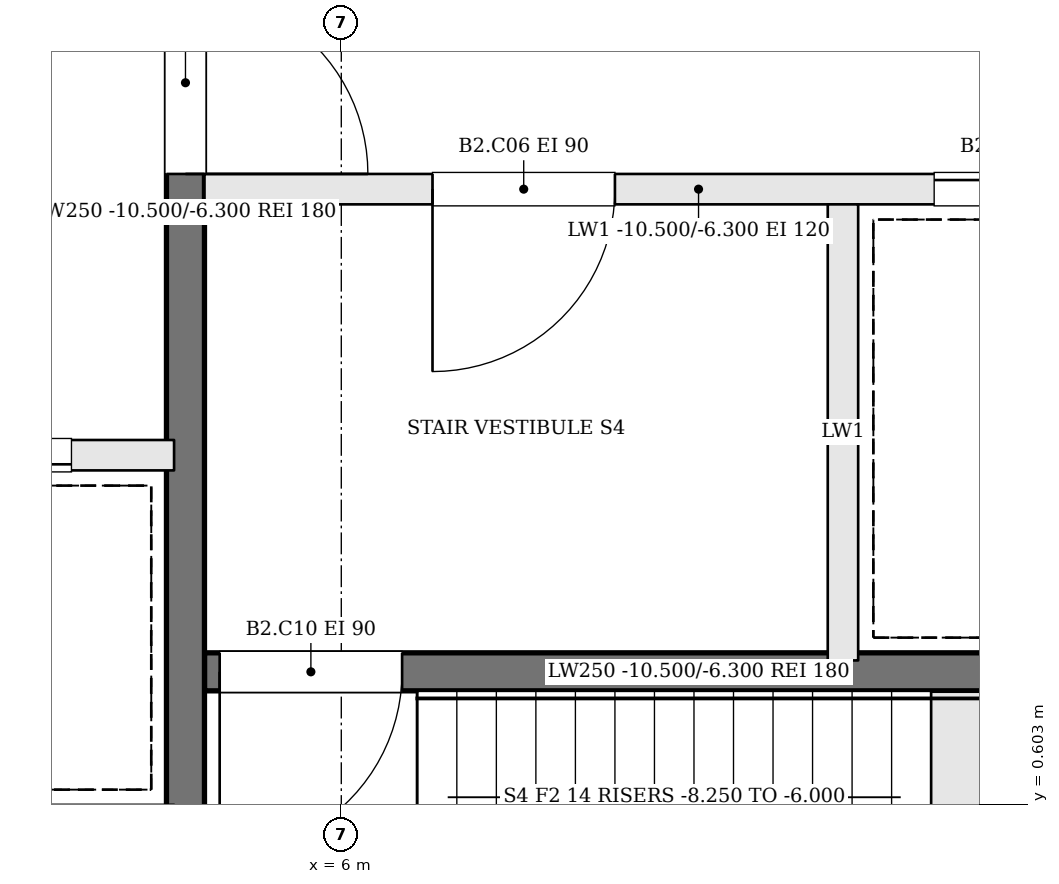
"""IFC4 building model, lengths in metres.
Left out: names, types, materials, properties, quantities, classifications, styles, units other than length and angle.
Written with IfcOpenShell. Run it as: python <this file> out.ifc"""

import sys

from ifc_helpers import new_model, si_unit, direction, frame, frame_2d, origin, place, context, subcontext, project, spatial, rectangle, extrude, element, fill, save


model = new_model("IFC4")
c1 = context("Model", 3, precision=1e-05, world=origin(), true_north=direction((0.0, 1.0)))
c2 = subcontext(c1, "Body", "Model", "MODEL_VIEW")
j1 = project(units=[si_unit("LENGTHUNIT", "METRE"), si_unit("PLANEANGLEUNIT", "RADIAN")], contexts=[c1])
p1 = place(None, origin())
s1 = spatial("IfcSite", under=j1, at=p1, CompositionType="ELEMENT")
p2 = place(p1, origin())
s2 = spatial("IfcBuilding", under=s1, at=p2, CompositionType="ELEMENT")
p3 = place(p2, frame((0.0, 0.0, -10.5)))
s3 = spatial("IfcBuildingStorey", under=s2, at=p3, CompositionType="ELEMENT", Elevation=-10.5)
p4 = place(p3, frame((11.6, 4.65, 0.0), z_axis=(0.0, 0.0, 1.0), x_axis=(-1.0, 0.0, 0.0)))
e1 = element("IfcWall", 1, at=p4, inside=s3, PredefinedType="SOLIDWALL", context=c2, shape_type="SweptSolid", body=[
    extrude(rectangle(XDim=6.5, YDim=0.2, at=frame_2d((3.25, 0.0))), origin(), (0.0, 0.0, 1.0), 4.2),
])
p5 = place(p4, frame((3.8, 0.0, 0.0)))
e2 = element("IfcOpeningElement", 2, at=p5, cuts=e1, PredefinedType="OPENING", context=c2, shape_type="SweptSolid", body=[
    extrude(rectangle(XDim=1.2, YDim=2.1, at=frame_2d((0.6, 1.05))), frame((0.0, 0.11, 0.0), z_axis=(0.0, -1.0, 0.0), x_axis=(1.0, 0.0, 0.0)), (0.0, 0.0, 1.0), 0.22),
])
p6 = place(p4, frame((0.5, 0.0, 0.0)))
e3 = element("IfcOpeningElement", 3, at=p6, cuts=e1, PredefinedType="OPENING", context=c2, shape_type="SweptSolid", body=[
    extrude(rectangle(XDim=1.2, YDim=2.1, at=frame_2d((0.6, 1.05))), frame((0.0, 0.11, 0.0), z_axis=(0.0, -1.0, 0.0), x_axis=(1.0, 0.0, 0.0)), (0.0, 0.0, 1.0), 0.22),
])
p7 = place(p3, frame((11.6, 1.475, 0.0), z_axis=(0.0, 0.0, 1.0), x_axis=(-1.0, 0.0, 0.0)))
e4 = element("IfcWall", 4, at=p7, inside=s3, PredefinedType="SOLIDWALL", context=c2, shape_type="SweptSolid", body=[
    extrude(rectangle(XDim=6.5, YDim=0.25, at=frame_2d((3.25, 0.0))), origin(), (0.0, 0.0, 1.0), 4.2),
])
p8 = place(p7, frame((5.2, 0.0, 0.0)))
e5 = element("IfcOpeningElement", 5, at=p8, cuts=e4, PredefinedType="OPENING", context=c2, shape_type="SweptSolid", body=[
    extrude(rectangle(XDim=1.2, YDim=2.1, at=frame_2d((0.6, 1.05))), frame((0.0, 0.135, 0.0), z_axis=(0.0, -1.0, 0.0), x_axis=(1.0, 0.0, 0.0)), (0.0, 0.0, 1.0), 0.27),
])
p9 = place(p3, frame((9.3, 4.55, 0.0), z_axis=(0.0, 0.0, 1.0), x_axis=(0.0, -1.0, 0.0)))
e6 = element("IfcWall", 6, at=p9, inside=s3, PredefinedType="SOLIDWALL", context=c2, shape_type="SweptSolid", body=[
    extrude(rectangle(XDim=3.0, YDim=0.2, at=frame_2d((1.5, 0.0))), origin(), (0.0, 0.0, 1.0), 4.2),
])
p10 = place(p3, frame((4.975, 10.6, 0.0), z_axis=(0.0, 0.0, 1.0), x_axis=(0.0, -1.0, 0.0)))
e7 = element("IfcWall", 7, at=p10, inside=s3, PredefinedType="SOLIDWALL", context=c2, shape_type="SweptSolid", body=[
    extrude(rectangle(XDim=12.2, YDim=0.25, at=frame_2d((6.1, 0.0))), origin(), (0.0, 0.0, 1.0), 4.2),
])
p11 = place(p10, frame((4.65, 0.0, 0.0)))
e8 = element("IfcOpeningElement", 8, at=p11, cuts=e7, PredefinedType="OPENING", context=c2, shape_type="SweptSolid", body=[
    extrude(rectangle(XDim=1.2, YDim=2.1, at=frame_2d((0.6, 1.05))), frame((0.0, 0.135, 0.0), z_axis=(0.0, -1.0, 0.0), x_axis=(1.0, 0.0, 0.0)), (0.0, 0.0, 1.0), 0.27),
])
p12 = place(p3, frame((-4.9, 2.9, 0.0), z_axis=(0.0, 0.0, 1.0), x_axis=(1.0, 0.0, 0.0)))
e9 = element("IfcWall", 9, at=p12, inside=s3, PredefinedType="SOLIDWALL", context=c2, shape_type="SweptSolid", body=[
    extrude(rectangle(XDim=9.8, YDim=0.2, at=frame_2d((4.9, 0.0))), origin(), (0.0, 0.0, 1.0), 4.2),
])
p13 = place(p12, frame((0.675, 0.0, 0.0)))
e10 = element("IfcOpeningElement", 10, at=p13, cuts=e9, PredefinedType="OPENING", context=c2, shape_type="SweptSolid", body=[
    extrude(rectangle(XDim=1.1, YDim=2.1, at=frame_2d((0.55, 1.05))), frame((0.0, 0.11, 0.0), z_axis=(0.0, -1.0, 0.0), x_axis=(1.0, 0.0, 0.0)), (0.0, 0.0, 1.0), 0.22),
])
p14 = place(p12, frame((3.125, 0.0, 0.0)))
e11 = element("IfcOpeningElement", 11, at=p14, cuts=e9, PredefinedType="OPENING", context=c2, shape_type="SweptSolid", body=[
    extrude(rectangle(XDim=1.1, YDim=2.1, at=frame_2d((0.55, 1.05))), frame((0.0, 0.11, 0.0), z_axis=(0.0, -1.0, 0.0), x_axis=(1.0, 0.0, 0.0)), (0.0, 0.0, 1.0), 0.22),
])
p15 = place(p12, frame((5.575, 0.0, 0.0)))
e12 = element("IfcOpeningElement", 12, at=p15, cuts=e9, PredefinedType="OPENING", context=c2, shape_type="SweptSolid", body=[
    extrude(rectangle(XDim=1.1, YDim=2.1, at=frame_2d((0.55, 1.05))), frame((0.0, 0.11, 0.0), z_axis=(0.0, -1.0, 0.0), x_axis=(1.0, 0.0, 0.0)), (0.0, 0.0, 1.0), 0.22),
])
p16 = place(p12, frame((8.025, 0.0, 0.0)))
e13 = element("IfcOpeningElement", 13, at=p16, cuts=e9, PredefinedType="OPENING", context=c2, shape_type="SweptSolid", body=[
    extrude(rectangle(XDim=1.1, YDim=2.1, at=frame_2d((0.55, 1.05))), frame((0.0, 0.11, 0.0), z_axis=(0.0, -1.0, 0.0), x_axis=(1.0, 0.0, 0.0)), (0.0, 0.0, 1.0), 0.22),
])
p17 = place(p11, origin())
e14 = element("IfcDoor", 14, at=p17, inside=s3, OperationType="SINGLE_SWING_RIGHT", PredefinedType="DOOR", context=c2, shape_type="SweptSolid", body=[
    extrude(rectangle(XDim=1.2, YDim=2.1, at=frame_2d((0.6, 1.05))), frame((0.0, 0.025, 0.0), z_axis=(0.0, -1.0, 0.0), x_axis=(1.0, 0.0, 0.0)), (0.0, 0.0, 1.0), 0.05),
])
fill(e8, e14)
p18 = place(p5, origin())
e15 = element("IfcDoor", 15, at=p18, inside=s3, OperationType="SINGLE_SWING_RIGHT", PredefinedType="DOOR", context=c2, shape_type="SweptSolid", body=[
    extrude(rectangle(XDim=1.2, YDim=2.1, at=frame_2d((0.6, 1.05))), frame((0.0, 0.025, 0.0), z_axis=(0.0, -1.0, 0.0), x_axis=(1.0, 0.0, 0.0)), (0.0, 0.0, 1.0), 0.05),
])
fill(e2, e15)
p19 = place(p8, origin())
e16 = element("IfcDoor", 16, at=p19, inside=s3, OperationType="SINGLE_SWING_RIGHT", PredefinedType="DOOR", context=c2, shape_type="SweptSolid", body=[
    extrude(rectangle(XDim=1.2, YDim=2.1, at=frame_2d((0.6, 1.05))), frame((0.0, 0.025, 0.0), z_axis=(0.0, -1.0, 0.0), x_axis=(1.0, 0.0, 0.0)), (0.0, 0.0, 1.0), 0.05),
])
fill(e5, e16)
p20 = place(p6, origin())
e17 = element("IfcDoor", 17, at=p20, inside=s3, OperationType="SLIDING_TO_RIGHT", PredefinedType="DOOR", context=c2, shape_type="SweptSolid", body=[
    extrude(rectangle(XDim=1.2, YDim=2.1, at=frame_2d((0.6, 1.05))), frame((0.0, 0.025, 0.0), z_axis=(0.0, -1.0, 0.0), x_axis=(1.0, 0.0, 0.0)), (0.0, 0.0, 1.0), 0.05),
])
fill(e3, e17)
p21 = place(p16, origin())
e18 = element("IfcDoor", 18, at=p21, inside=s3, OperationType="SLIDING_TO_RIGHT", PredefinedType="DOOR", context=c2, shape_type="SweptSolid", body=[
    extrude(rectangle(XDim=1.1, YDim=2.1, at=frame_2d((0.55, 1.05))), frame((0.0, 0.025, 0.0), z_axis=(0.0, -1.0, 0.0), x_axis=(1.0, 0.0, 0.0)), (0.0, 0.0, 1.0), 0.05),
])
fill(e13, e18)
save(model, sys.argv[1])
